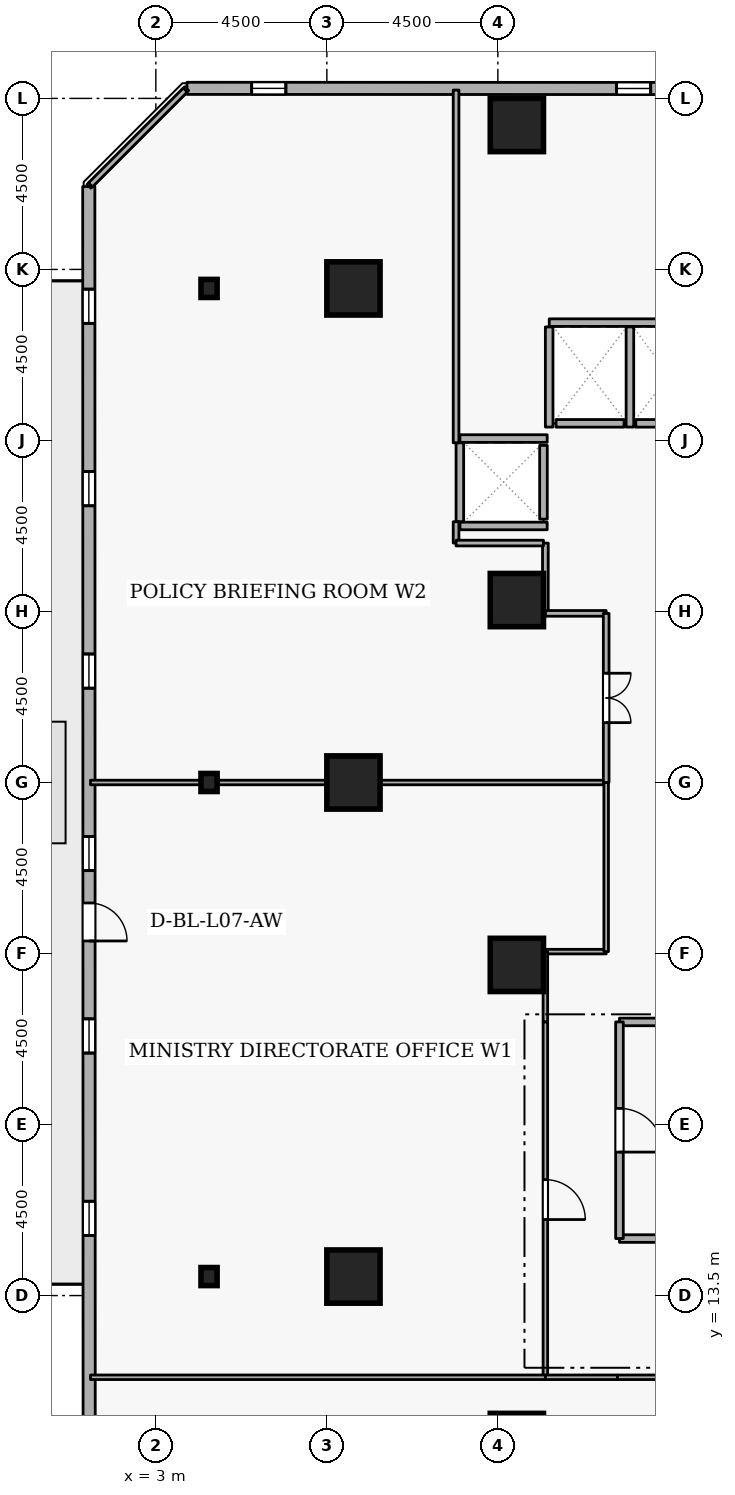
"""IFC4 building model, lengths in metres.
Left out: names, types, materials, properties, quantities, classifications, styles, units other than length and angle.
Written with IfcOpenShell. Run it as: python <this file> out.ifc"""

import sys

from ifc_helpers import new_model, si_unit, direction, frame, frame_2d, origin, origin_2d, place, context, subcontext, project, spatial, rectangle, i_section, extrude, element, fill, save


model = new_model("IFC4")
c1 = context("Model", 3, precision=1e-05, world=origin(), true_north=direction((0.0, 1.0)))
c2 = subcontext(c1, "Body", "Model", "MODEL_VIEW")
j1 = project(units=[si_unit("LENGTHUNIT", "METRE"), si_unit("PLANEANGLEUNIT", "RADIAN")], contexts=[c1])
p1 = place(None, origin())
s1 = spatial("IfcSite", under=j1, at=p1, CompositionType="ELEMENT")
p2 = place(p1, origin())
s2 = spatial("IfcBuilding", under=s1, at=p2, CompositionType="ELEMENT")
p3 = place(p2, frame((0.0, 0.0, 31.5)))
s3 = spatial("IfcBuildingStorey", under=s2, at=p3, CompositionType="ELEMENT", Elevation=31.5)
for number, where, z_axis, x_axis in (
    (1, (12.5, 9.7, 0.0), (0.0, 0.0, 1.0), (1.0, 0.0, 0.0)),
    (2, (12.5, 44.3, 0.0), (0.0, 0.0, 1.0), (1.0, 0.0, 0.0)),
    (3, (8.2, 14.0, 0.0), (0.0, 0.0, 1.0), (1.0, 0.0, 0.0)),
    (4, (8.2, 27.0, 0.0), (0.0, 0.0, 1.0), (1.0, 0.0, 0.0)),
    (5, (8.2, 40.0, 0.0), (0.0, 0.0, 1.0), (1.0, 0.0, 0.0)),
    (6, (12.5, 22.2, 0.0), (0.0, 0.0, 1.0), (1.0, 0.0, 0.0)),
    (7, (12.5, 31.8, 0.0), (0.0, 0.0, 1.0), (1.0, 0.0, 0.0)),
):
    element("IfcColumn", number, at=place(p3, frame(where, z_axis=z_axis, x_axis=x_axis)), inside=s3, PredefinedType="COLUMN", context=c2, shape_type="SweptSolid", body=[
        extrude(rectangle(XDim=1.4, YDim=1.4, at=origin_2d()), origin(), (0.0, 0.0, 1.0), 3.6),
    ])
for number, where, z_axis, x_axis in (
    (8, (4.4, 14.0, 0.0), (0.0, 0.0, 1.0), (1.0, 0.0, 0.0)),
    (9, (4.4, 27.0, 0.0), (0.0, 0.0, 1.0), (1.0, 0.0, 0.0)),
    (10, (4.4, 40.0, 0.0), (0.0, 0.0, 1.0), (1.0, 0.0, 0.0)),
):
    element("IfcColumn", number, at=place(p3, frame(where, z_axis=z_axis, x_axis=x_axis)), inside=s3, PredefinedType="COLUMN", context=c2, shape_type="SweptSolid", body=[
        extrude(i_section(OverallWidth=0.424, OverallDepth=0.475, WebThickness=0.048, FlangeThickness=0.077, FilletRadius=0.015, at=origin_2d()), origin(), (0.0, 0.0, 1.0), 3.6),
    ])
p4 = place(p3, frame((37.921, 45.254, 0.0), z_axis=(0.0, 0.0, 1.0), x_axis=(-0.999999952618, 0.000307837676, 0.0)))
e11 = element("IfcWall", 11, at=p4, inside=s3, PredefinedType="STANDARD", context=c2, shape_type="SweptSolid", body=[
    extrude(rectangle(XDim=34.103, YDim=0.32, at=frame_2d((17.051, 0.0))), origin(), (0.0, 0.0, 1.0), 2.7),
])
p5 = place(p4, frame((2.7, 0.0, 0.72)))
e12 = element("IfcOpeningElement", 12, at=p5, cuts=e11, PredefinedType="OPENING", context=c2, shape_type="SweptSolid", body=[
    extrude(rectangle(XDim=0.9, YDim=1.75, at=frame_2d((0.45, 0.875))), frame((0.0, 0.17, 0.0), z_axis=(0.0, -1.0, 0.0), x_axis=(1.0, 0.0, 0.0)), (0.0, 0.0, 1.0), 0.34),
])
p6 = place(p4, frame((7.5, 0.0, 0.72)))
e13 = element("IfcOpeningElement", 13, at=p6, cuts=e11, PredefinedType="OPENING", context=c2, shape_type="SweptSolid", body=[
    extrude(rectangle(XDim=0.9, YDim=1.75, at=frame_2d((0.45, 0.875))), frame((0.0, 0.17, 0.0), z_axis=(0.0, -1.0, 0.0), x_axis=(1.0, 0.0, 0.0)), (0.0, 0.0, 1.0), 0.34),
])
p7 = place(p4, frame((17.1, 0.0, 0.72)))
e14 = element("IfcOpeningElement", 14, at=p7, cuts=e11, PredefinedType="OPENING", context=c2, shape_type="SweptSolid", body=[
    extrude(rectangle(XDim=0.9, YDim=1.75, at=frame_2d((0.45, 0.875))), frame((0.0, 0.17, 0.0), z_axis=(0.0, -1.0, 0.0), x_axis=(1.0, 0.0, 0.0)), (0.0, 0.0, 1.0), 0.34),
])
p8 = place(p4, frame((21.9, 0.0, 0.72)))
e15 = element("IfcOpeningElement", 15, at=p8, cuts=e11, PredefinedType="OPENING", context=c2, shape_type="SweptSolid", body=[
    extrude(rectangle(XDim=0.9, YDim=1.75, at=frame_2d((0.45, 0.875))), frame((0.0, 0.17, 0.0), z_axis=(0.0, -1.0, 0.0), x_axis=(1.0, 0.0, 0.0)), (0.0, 0.0, 1.0), 0.34),
])
p9 = place(p4, frame((31.5, 0.0, 0.72)))
e16 = element("IfcOpeningElement", 16, at=p9, cuts=e11, PredefinedType="OPENING", context=c2, shape_type="SweptSolid", body=[
    extrude(rectangle(XDim=0.9, YDim=1.75, at=frame_2d((0.45, 0.875))), frame((0.0, 0.17, 0.0), z_axis=(0.0, -1.0, 0.0), x_axis=(1.0, 0.0, 0.0)), (0.0, 0.0, 1.0), 0.34),
])
p10 = place(p3, frame((1.235, 42.681, 0.0), z_axis=(0.0, 0.0, 1.0), x_axis=(0.000307837676, -0.999999952618, 0.0)))
e17 = element("IfcWall", 17, at=p10, inside=s3, PredefinedType="STANDARD", context=c2, shape_type="SweptSolid", body=[
    extrude(rectangle(XDim=34.103, YDim=0.32, at=frame_2d((17.051, 0.0))), origin(), (0.0, 0.0, 1.0), 2.7),
])
p11 = place(p10, frame((18.851, 0.0, 0.0)))
e18 = element("IfcOpeningElement", 18, at=p11, cuts=e17, PredefinedType="OPENING", context=c2, shape_type="SweptSolid", body=[
    extrude(rectangle(XDim=1.0, YDim=2.08, at=frame_2d((0.5, 1.04))), frame((0.0, 0.17, 0.0), z_axis=(0.0, -1.0, 0.0), x_axis=(1.0, 0.0, 0.0)), (0.0, 0.0, 1.0), 0.34),
])
p12 = place(p10, frame((2.7, 0.0, 0.72)))
e19 = element("IfcOpeningElement", 19, at=p12, cuts=e17, PredefinedType="OPENING", context=c2, shape_type="SweptSolid", body=[
    extrude(rectangle(XDim=0.9, YDim=1.75, at=frame_2d((0.45, 0.875))), frame((0.0, 0.17, 0.0), z_axis=(0.0, -1.0, 0.0), x_axis=(1.0, 0.0, 0.0)), (0.0, 0.0, 1.0), 0.34),
])
p13 = place(p10, frame((7.5, 0.0, 0.72)))
e20 = element("IfcOpeningElement", 20, at=p13, cuts=e17, PredefinedType="OPENING", context=c2, shape_type="SweptSolid", body=[
    extrude(rectangle(XDim=0.9, YDim=1.75, at=frame_2d((0.45, 0.875))), frame((0.0, 0.17, 0.0), z_axis=(0.0, -1.0, 0.0), x_axis=(1.0, 0.0, 0.0)), (0.0, 0.0, 1.0), 0.34),
])
p14 = place(p10, frame((12.3, 0.0, 0.72)))
e21 = element("IfcOpeningElement", 21, at=p14, cuts=e17, PredefinedType="OPENING", context=c2, shape_type="SweptSolid", body=[
    extrude(rectangle(XDim=0.9, YDim=1.75, at=frame_2d((0.45, 0.875))), frame((0.0, 0.17, 0.0), z_axis=(0.0, -1.0, 0.0), x_axis=(1.0, 0.0, 0.0)), (0.0, 0.0, 1.0), 0.34),
])
p15 = place(p10, frame((17.1, 0.0, 0.72)))
e22 = element("IfcOpeningElement", 22, at=p15, cuts=e17, PredefinedType="OPENING", context=c2, shape_type="SweptSolid", body=[
    extrude(rectangle(XDim=0.9, YDim=1.75, at=frame_2d((0.45, 0.875))), frame((0.0, 0.17, 0.0), z_axis=(0.0, -1.0, 0.0), x_axis=(1.0, 0.0, 0.0)), (0.0, 0.0, 1.0), 0.34),
])
p16 = place(p10, frame((21.9, 0.0, 0.72)))
e23 = element("IfcOpeningElement", 23, at=p16, cuts=e17, PredefinedType="OPENING", context=c2, shape_type="SweptSolid", body=[
    extrude(rectangle(XDim=0.9, YDim=1.75, at=frame_2d((0.45, 0.875))), frame((0.0, 0.17, 0.0), z_axis=(0.0, -1.0, 0.0), x_axis=(1.0, 0.0, 0.0)), (0.0, 0.0, 1.0), 0.34),
])
p17 = place(p10, frame((26.7, 0.0, 0.72)))
e24 = element("IfcOpeningElement", 24, at=p17, cuts=e17, PredefinedType="OPENING", context=c2, shape_type="SweptSolid", body=[
    extrude(rectangle(XDim=0.9, YDim=1.75, at=frame_2d((0.45, 0.875))), frame((0.0, 0.17, 0.0), z_axis=(0.0, -1.0, 0.0), x_axis=(1.0, 0.0, 0.0)), (0.0, 0.0, 1.0), 0.34),
])
p18 = place(p3, frame((17.37, 36.45, 0.0), z_axis=(0.0, 0.0, 1.0), x_axis=(-1.0, 0.0, 0.0)))
e25 = element("IfcWall", 25, at=p18, inside=s3, PredefinedType="STANDARD", context=c2, shape_type="SweptSolid", body=[
    extrude(rectangle(XDim=1.74, YDim=0.2, at=frame_2d((0.87, 0.0))), origin(), (0.0, 0.0, 1.0), 3.34),
])
p19 = place(p3, frame((15.32, 36.45, 0.0), z_axis=(0.0, 0.0, 1.0), x_axis=(-1.0, 0.0, 0.0)))
e26 = element("IfcWall", 26, at=p19, inside=s3, PredefinedType="STANDARD", context=c2, shape_type="SweptSolid", body=[
    extrude(rectangle(XDim=1.79, YDim=0.2, at=frame_2d((0.895, 0.0))), origin(), (0.0, 0.0, 1.0), 3.34),
])
p20 = place(p3, frame((13.2, 33.93, 0.0), z_axis=(0.0, 0.0, 1.0), x_axis=(0.0, 1.0, 0.0)))
e27 = element("IfcWall", 27, at=p20, inside=s3, PredefinedType="STANDARD", context=c2, shape_type="SweptSolid", body=[
    extrude(rectangle(XDim=1.94, YDim=0.2, at=frame_2d((0.97, 0.0))), origin(), (0.0, 0.0, 1.0), 3.34),
])
p21 = place(p3, frame((13.352, 39.1, 0.0), z_axis=(0.0, 0.0, 1.0), x_axis=(1.0, 0.0, 0.0)))
e28 = element("IfcWall", 28, at=p21, inside=s3, PredefinedType="STANDARD", context=c2, shape_type="SweptSolid", body=[
    extrude(rectangle(XDim=4.196, YDim=0.2, at=frame_2d((2.098, 0.0))), origin(), (0.0, 0.0, 1.0), 3.34),
])
for number, where, z_axis, x_axis in (
    (29, (15.475, 36.352, 0.0), (0.0, 0.0, 1.0), (0.0, 1.0, 0.0)),
    (30, (13.35, 36.352, 0.0), (0.0, 0.0, 1.0), (0.0, 1.0, 0.0)),
):
    element("IfcWall", number, at=place(p3, frame(where, z_axis=z_axis, x_axis=x_axis)), inside=s3, PredefinedType="STANDARD", context=c2, shape_type="SweptSolid", body=[
        extrude(rectangle(XDim=2.636, YDim=0.2, at=frame_2d((1.318, 0.0))), origin(), (0.0, 0.0, 1.0), 3.34),
    ])
for number, where, z_axis, x_axis in (
    (31, (11.002, 36.05, 0.0), (0.0, 0.0, 1.0), (1.0, 0.0, 0.0)),
    (32, (11.002, 33.75, 0.0), (0.0, 0.0, 1.0), (1.0, 0.0, 0.0)),
):
    element("IfcWall", number, at=place(p3, frame(where, z_axis=z_axis, x_axis=x_axis)), inside=s3, PredefinedType="STANDARD", context=c2, shape_type="SweptSolid", body=[
        extrude(rectangle(XDim=2.296, YDim=0.2, at=frame_2d((1.148, 0.0))), origin(), (0.0, 0.0, 1.0), 3.34),
    ])
p22 = place(p3, frame((11.0, 33.862, 0.0), z_axis=(0.0, 0.0, 1.0), x_axis=(0.0, 1.0, 0.0)))
e33 = element("IfcWall", 33, at=p22, inside=s3, PredefinedType="STANDARD", context=c2, shape_type="SweptSolid", body=[
    extrude(rectangle(XDim=2.076, YDim=0.2, at=frame_2d((1.038, 0.0))), origin(), (0.0, 0.0, 1.0), 3.34),
])
for number, where, z_axis, x_axis in (
    (34, (15.2, 15.0, 0.0), (0.0, 0.0, 1.0), (1.0, 0.0, 0.0)),
    (35, (17.7, 20.7, 0.0), (0.0, 0.0, 1.0), (-1.0, 0.0, 0.0)),
):
    element("IfcWall", number, at=place(p3, frame(where, z_axis=z_axis, x_axis=x_axis)), inside=s3, PredefinedType="STANDARD", context=c2, shape_type="SweptSolid", body=[
        extrude(rectangle(XDim=2.5, YDim=0.2, at=frame_2d((1.25, 0.0))), origin(), (0.0, 0.0, 1.0), 3.34),
    ])
p23 = place(p3, frame((15.2, 20.7, 0.0), z_axis=(0.0, 0.0, 1.0), x_axis=(0.0, -1.0, 0.0)))
e36 = element("IfcWall", 36, at=p23, inside=s3, PredefinedType="STANDARD", context=c2, shape_type="SweptSolid", body=[
    extrude(rectangle(XDim=5.7, YDim=0.2, at=frame_2d((2.85, 0.0))), origin(), (0.0, 0.0, 1.0), 3.34),
])
p24 = place(p23, frame((2.275, 0.0, 0.0)))
e37 = element("IfcOpeningElement", 37, at=p24, cuts=e36, PredefinedType="OPENING", context=c2, shape_type="SweptSolid", body=[
    extrude(rectangle(XDim=1.15, YDim=2.1, at=frame_2d((0.575, 1.05))), frame((0.0, 0.11, 0.0), z_axis=(0.0, -1.0, 0.0), x_axis=(1.0, 0.0, 0.0)), (0.0, 0.0, 1.0), 0.22),
])
p25 = place(p3, frame((14.85, 22.55, 0.0), z_axis=(0.0, 0.0, 1.0), x_axis=(-1.0, 0.0, 0.0)))
e38 = element("IfcWall", 38, at=p25, inside=s3, PredefinedType="PARTITIONING", context=c2, shape_type="SweptSolid", body=[
    extrude(rectangle(XDim=1.6, YDim=0.12, at=frame_2d((0.8, 0.0))), origin(), (0.0, 0.0, 1.0), 3.34),
])
p26 = place(p3, frame((13.25, 22.55, 0.0), z_axis=(0.0, 0.0, 1.0), x_axis=(0.0, -1.0, 0.0)))
e39 = element("IfcWall", 39, at=p26, inside=s3, PredefinedType="PARTITIONING", context=c2, shape_type="SweptSolid", body=[
    extrude(rectangle(XDim=1.85, YDim=0.12, at=frame_2d((0.925, 0.0))), origin(), (0.0, 0.0, 1.0), 3.34),
])
p27 = place(p3, frame((13.25, 20.7, 0.0), z_axis=(0.0, 0.0, 1.0), x_axis=(0.0, -1.0, 0.0)))
e40 = element("IfcWall", 40, at=p27, inside=s3, PredefinedType="PARTITIONING", context=c2, shape_type="SweptSolid", body=[
    extrude(rectangle(XDim=9.35, YDim=0.12, at=frame_2d((4.675, 0.0))), origin(), (0.0, 0.0, 1.0), 3.34),
])
p28 = place(p27, frame((4.15, 0.0, 0.0)))
e41 = element("IfcOpeningElement", 41, at=p28, cuts=e40, PredefinedType="OPENING", context=c2, shape_type="SweptSolid", body=[
    extrude(rectangle(XDim=1.05, YDim=2.1, at=frame_2d((0.525, 1.05))), frame((0.0, 0.07, 0.0), z_axis=(0.0, -1.0, 0.0), x_axis=(1.0, 0.0, 0.0)), (0.0, 0.0, 1.0), 0.14),
])
p29 = place(p3, frame((13.25, 11.35, 0.0), z_axis=(0.0, 0.0, 1.0), x_axis=(-1.0, 0.0, 0.0)))
e42 = element("IfcWall", 42, at=p29, inside=s3, PredefinedType="PARTITIONING", context=c2, shape_type="SweptSolid", body=[
    extrude(rectangle(XDim=11.97, YDim=0.12, at=frame_2d((5.985, 0.0))), origin(), (0.0, 0.0, 1.0), 3.34),
])
p30 = place(p3, frame((1.28, 27.0, 0.0), z_axis=(0.0, 0.0, 1.0), x_axis=(1.0, 0.0, 0.0)))
e43 = element("IfcWall", 43, at=p30, inside=s3, PredefinedType="PARTITIONING", context=c2, shape_type="SweptSolid", body=[
    extrude(rectangle(XDim=13.57, YDim=0.12, at=frame_2d((6.785, 0.0))), origin(), (0.0, 0.0, 1.0), 2.878),
])
p31 = place(p3, frame((14.85, 27.0, 0.0), z_axis=(0.0, 0.0, 1.0), x_axis=(0.0, -1.0, 0.0)))
e44 = element("IfcWall", 44, at=p31, inside=s3, PredefinedType="PARTITIONING", context=c2, shape_type="SweptSolid", body=[
    extrude(rectangle(XDim=4.45, YDim=0.12, at=frame_2d((2.225, 0.0))), origin(), (0.0, 0.0, 1.0), 3.34),
])
p32 = place(p3, frame((13.25, 33.3, 0.0), z_axis=(0.0, 0.0, 1.0), x_axis=(0.0, -1.0, 0.0)))
e45 = element("IfcWall", 45, at=p32, inside=s3, PredefinedType="PARTITIONING", context=c2, shape_type="SweptSolid", body=[
    extrude(rectangle(XDim=1.85, YDim=0.15, at=frame_2d((0.925, 0.0))), origin(), (0.0, 0.0, 1.0), 3.34),
])
p33 = place(p3, frame((13.25, 31.45, 0.0), z_axis=(0.0, 0.0, 1.0), x_axis=(1.0, 0.0, 0.0)))
e46 = element("IfcWall", 46, at=p33, inside=s3, PredefinedType="PARTITIONING", context=c2, shape_type="SweptSolid", body=[
    extrude(rectangle(XDim=1.6, YDim=0.15, at=frame_2d((0.8, 0.0))), origin(), (0.0, 0.0, 1.0), 3.34),
])
p34 = place(p3, frame((14.85, 31.45, 0.0), z_axis=(0.0, 0.0, 1.0), x_axis=(0.0, -1.0, 0.0)))
e47 = element("IfcWall", 47, at=p34, inside=s3, PredefinedType="PARTITIONING", context=c2, shape_type="SweptSolid", body=[
    extrude(rectangle(XDim=4.45, YDim=0.15, at=frame_2d((2.225, 0.0))), origin(), (0.0, 0.0, 1.0), 3.34),
])
p35 = place(p34, frame((1.575, 0.0, 0.0)))
e48 = element("IfcOpeningElement", 48, at=p35, cuts=e47, PredefinedType="OPENING", context=c2, shape_type="SweptSolid", body=[
    extrude(rectangle(XDim=1.3, YDim=2.12, at=frame_2d((0.65, 1.06))), frame((0.0, 0.085, 0.0), z_axis=(0.0, -1.0, 0.0), x_axis=(1.0, 0.0, 0.0)), (0.0, 0.0, 1.0), 0.17),
])
p36 = place(p3, frame((1.28, 42.725, 0.0), z_axis=(0.0, 0.0, 1.0), x_axis=(0.707106781187, 0.707106781187, 0.0)))
e49 = element("IfcWall", 49, at=p36, inside=s3, PredefinedType="PARTITIONING", context=c2, shape_type="SweptSolid", body=[
    extrude(rectangle(XDim=3.528, YDim=0.15, at=frame_2d((1.764, 0.0))), origin(), (0.0, 0.0, 1.0), 3.34),
])
p37 = place(p3, frame((10.9, 45.22, 0.0), z_axis=(0.0, 0.0, 1.0), x_axis=(0.0, -1.0, 0.0)))
e50 = element("IfcWall", 50, at=p37, inside=s3, PredefinedType="PARTITIONING", context=c2, shape_type="SweptSolid", body=[
    extrude(rectangle(XDim=9.282, YDim=0.15, at=frame_2d((4.641, 0.0))), origin(), (0.0, 0.0, 1.0), 3.34),
])
p38 = place(p3, frame((10.9, 33.862, 0.0), z_axis=(0.0, 0.0, 1.0), x_axis=(0.0, -1.0, 0.0)))
e51 = element("IfcWall", 51, at=p38, inside=s3, PredefinedType="PARTITIONING", context=c2, shape_type="SweptSolid", body=[
    extrude(rectangle(XDim=0.562, YDim=0.15, at=frame_2d((0.281, 0.0))), origin(), (0.0, 0.0, 1.0), 3.34),
])
p39 = place(p3, frame((10.9, 33.3, 0.0), z_axis=(0.0, 0.0, 1.0), x_axis=(1.0, 0.0, 0.0)))
e52 = element("IfcWall", 52, at=p39, inside=s3, PredefinedType="PARTITIONING", context=c2, shape_type="SweptSolid", body=[
    extrude(rectangle(XDim=2.3, YDim=0.15, at=frame_2d((1.15, 0.0))), origin(), (0.0, 0.0, 1.0), 3.34),
])
p40 = place(p3, frame((13.25, 11.35, 0.0), z_axis=(0.0, 0.0, 1.0), x_axis=(1.0, 0.0, 0.0)))
e53 = element("IfcWall", 53, at=p40, inside=s3, PredefinedType="PARTITIONING", context=c2, shape_type="SweptSolid", body=[
    extrude(rectangle(XDim=1.9, YDim=0.12, at=frame_2d((0.95, 0.0))), origin(), (0.0, 0.0, 1.0), 3.34),
])
p41 = place(p3, frame((15.15, 11.35, 0.0), z_axis=(0.0, 0.0, 1.0), x_axis=(1.0, 0.0, 0.0)))
e54 = element("IfcWall", 54, at=p41, inside=s3, PredefinedType="PARTITIONING", context=c2, shape_type="SweptSolid", body=[
    extrude(rectangle(XDim=10.35, YDim=0.12, at=frame_2d((5.175, 0.0))), origin(), (0.0, 0.0, 1.0), 3.34),
])
p42 = place(p41, frame((4.65, 0.0, 0.0)))
e55 = element("IfcOpeningElement", 55, at=p42, cuts=e54, PredefinedType="OPENING", context=c2, shape_type="SweptSolid", body=[
    extrude(rectangle(XDim=1.05, YDim=2.1, at=frame_2d((0.525, 1.05))), frame((0.0, 0.07, 0.0), z_axis=(0.0, -1.0, 0.0), x_axis=(1.0, 0.0, 0.0)), (0.0, 0.0, 1.0), 0.14),
])
p43 = place(p8, origin())
e56 = element("IfcWindow", 56, at=p43, inside=s3, PartitioningType="SINGLE_PANEL", PredefinedType="WINDOW", context=c2, shape_type="SweptSolid", body=[
    extrude(rectangle(XDim=0.9, YDim=1.75, at=frame_2d((0.45, 0.875))), frame((0.0, 0.03, 0.0), z_axis=(0.0, -1.0, 0.0), x_axis=(1.0, 0.0, 0.0)), (0.0, 0.0, 1.0), 0.06),
])
fill(e15, e56)
p44 = place(p9, origin())
e57 = element("IfcWindow", 57, at=p44, inside=s3, PartitioningType="SINGLE_PANEL", PredefinedType="WINDOW", context=c2, shape_type="SweptSolid", body=[
    extrude(rectangle(XDim=0.9, YDim=1.75, at=frame_2d((0.45, 0.875))), frame((0.0, 0.03, 0.0), z_axis=(0.0, -1.0, 0.0), x_axis=(1.0, 0.0, 0.0)), (0.0, 0.0, 1.0), 0.06),
])
fill(e16, e57)
p45 = place(p11, origin())
e58 = element("IfcDoor", 58, at=p45, inside=s3, OperationType="SINGLE_SWING_RIGHT", PredefinedType="DOOR", context=c2, shape_type="SweptSolid", body=[
    extrude(rectangle(XDim=1.0, YDim=2.08, at=frame_2d((0.5, 1.04))), frame((0.0, 0.025, 0.0), z_axis=(0.0, -1.0, 0.0), x_axis=(1.0, 0.0, 0.0)), (0.0, 0.0, 1.0), 0.05),
])
fill(e18, e58)
p46 = place(p12, origin())
e59 = element("IfcWindow", 59, at=p46, inside=s3, PartitioningType="SINGLE_PANEL", PredefinedType="WINDOW", context=c2, shape_type="SweptSolid", body=[
    extrude(rectangle(XDim=0.9, YDim=1.75, at=frame_2d((0.45, 0.875))), frame((0.0, 0.03, 0.0), z_axis=(0.0, -1.0, 0.0), x_axis=(1.0, 0.0, 0.0)), (0.0, 0.0, 1.0), 0.06),
])
fill(e19, e59)
p47 = place(p13, origin())
e60 = element("IfcWindow", 60, at=p47, inside=s3, PartitioningType="SINGLE_PANEL", PredefinedType="WINDOW", context=c2, shape_type="SweptSolid", body=[
    extrude(rectangle(XDim=0.9, YDim=1.75, at=frame_2d((0.45, 0.875))), frame((0.0, 0.03, 0.0), z_axis=(0.0, -1.0, 0.0), x_axis=(1.0, 0.0, 0.0)), (0.0, 0.0, 1.0), 0.06),
])
fill(e20, e60)
p48 = place(p14, origin())
e61 = element("IfcWindow", 61, at=p48, inside=s3, PartitioningType="SINGLE_PANEL", PredefinedType="WINDOW", context=c2, shape_type="SweptSolid", body=[
    extrude(rectangle(XDim=0.9, YDim=1.75, at=frame_2d((0.45, 0.875))), frame((0.0, 0.03, 0.0), z_axis=(0.0, -1.0, 0.0), x_axis=(1.0, 0.0, 0.0)), (0.0, 0.0, 1.0), 0.06),
])
fill(e21, e61)
p49 = place(p15, origin())
e62 = element("IfcWindow", 62, at=p49, inside=s3, PartitioningType="SINGLE_PANEL", PredefinedType="WINDOW", context=c2, shape_type="SweptSolid", body=[
    extrude(rectangle(XDim=0.9, YDim=1.75, at=frame_2d((0.45, 0.875))), frame((0.0, 0.03, 0.0), z_axis=(0.0, -1.0, 0.0), x_axis=(1.0, 0.0, 0.0)), (0.0, 0.0, 1.0), 0.06),
])
fill(e22, e62)
p50 = place(p16, origin())
e63 = element("IfcWindow", 63, at=p50, inside=s3, PartitioningType="SINGLE_PANEL", PredefinedType="WINDOW", context=c2, shape_type="SweptSolid", body=[
    extrude(rectangle(XDim=0.9, YDim=1.75, at=frame_2d((0.45, 0.875))), frame((0.0, 0.03, 0.0), z_axis=(0.0, -1.0, 0.0), x_axis=(1.0, 0.0, 0.0)), (0.0, 0.0, 1.0), 0.06),
])
fill(e23, e63)
p51 = place(p17, origin())
e64 = element("IfcWindow", 64, at=p51, inside=s3, PartitioningType="SINGLE_PANEL", PredefinedType="WINDOW", context=c2, shape_type="SweptSolid", body=[
    extrude(rectangle(XDim=0.9, YDim=1.75, at=frame_2d((0.45, 0.875))), frame((0.0, 0.03, 0.0), z_axis=(0.0, -1.0, 0.0), x_axis=(1.0, 0.0, 0.0)), (0.0, 0.0, 1.0), 0.06),
])
fill(e24, e64)
p52 = place(p24, origin())
e65 = element("IfcDoor", 65, at=p52, inside=s3, OperationType="SINGLE_SWING_RIGHT", PredefinedType="DOOR", context=c2, shape_type="SweptSolid", body=[
    extrude(rectangle(XDim=1.15, YDim=2.1, at=frame_2d((0.575, 1.05))), frame((0.0, 0.025, 0.0), z_axis=(0.0, -1.0, 0.0), x_axis=(1.0, 0.0, 0.0)), (0.0, 0.0, 1.0), 0.05),
])
fill(e37, e65)
p53 = place(p28, origin())
e66 = element("IfcDoor", 66, at=p53, inside=s3, OperationType="SINGLE_SWING_RIGHT", PredefinedType="DOOR", context=c2, shape_type="SweptSolid", body=[
    extrude(rectangle(XDim=1.05, YDim=2.1, at=frame_2d((0.525, 1.05))), frame((0.0, 0.025, 0.0), z_axis=(0.0, -1.0, 0.0), x_axis=(1.0, 0.0, 0.0)), (0.0, 0.0, 1.0), 0.05),
])
fill(e41, e66)
p54 = place(p35, origin())
e67 = element("IfcDoor", 67, at=p54, inside=s3, OperationType="DOUBLE_DOOR_SINGLE_SWING", PredefinedType="DOOR", context=c2, shape_type="SweptSolid", body=[
    extrude(rectangle(XDim=1.3, YDim=2.12, at=frame_2d((0.65, 1.06))), frame((0.0, 0.025, 0.0), z_axis=(0.0, -1.0, 0.0), x_axis=(1.0, 0.0, 0.0)), (0.0, 0.0, 1.0), 0.05),
])
fill(e48, e67)
save(model, sys.argv[1])
